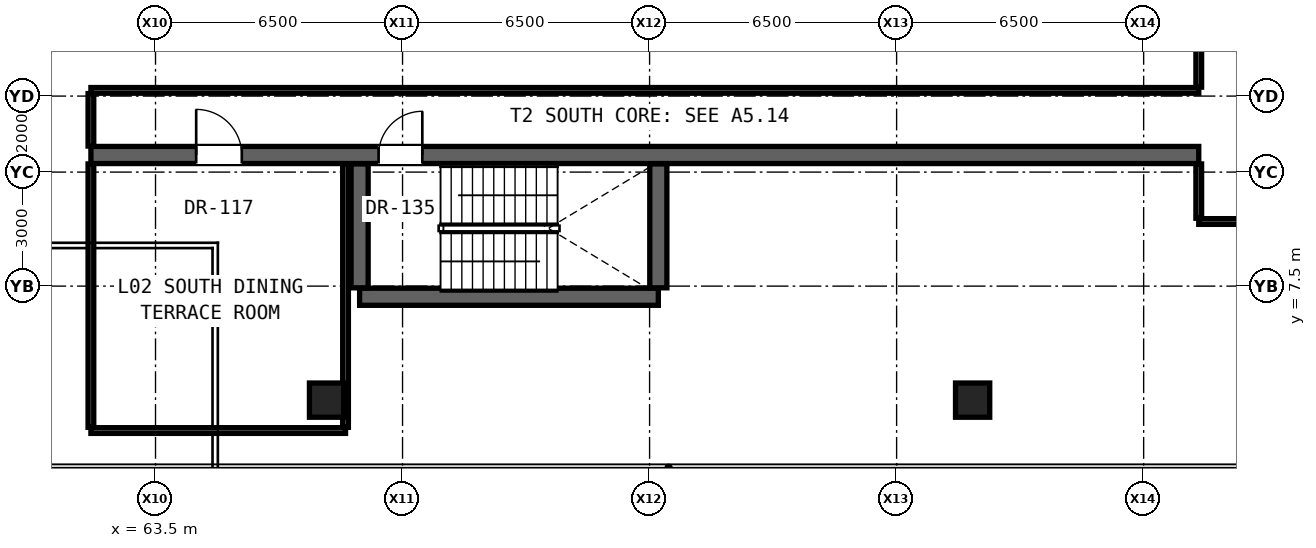
"""IFC4 building model, lengths in metres.
Left out: names, types, materials, properties, quantities, classifications, styles, units other than length and angle.
Written with IfcOpenShell. Run it as: python <this file> out.ifc"""

import sys

from ifc_helpers import new_model, si_unit, direction, frame, frame_2d, origin, origin_2d, place, context, subcontext, project, spatial, rectangle, extrude, element, fill, save


model = new_model("IFC4")
c1 = context("Model", 3, precision=1e-05, world=origin(), true_north=direction((0.0, 1.0)))
c2 = subcontext(c1, "Body", "Model", "MODEL_VIEW")
j1 = project(units=[si_unit("LENGTHUNIT", "METRE"), si_unit("PLANEANGLEUNIT", "RADIAN")], contexts=[c1])
p1 = place(None, origin())
s1 = spatial("IfcSite", under=j1, at=p1, CompositionType="ELEMENT")
p2 = place(p1, origin())
s2 = spatial("IfcBuilding", under=s1, at=p2, CompositionType="ELEMENT")
p3 = place(p2, frame((0.0, 0.0, 9.5)))
s3 = spatial("IfcBuildingStorey", under=s2, at=p3, CompositionType="ELEMENT", Elevation=9.5)
for number, where, z_axis, x_axis in (
    (1, (68.0, 4.5, 0.0), (0.0, 0.0, 1.0), (1.0, 0.0, 0.0)),
    (2, (85.0, 4.5, 0.0), (0.0, 0.0, 1.0), (1.0, 0.0, 0.0)),
):
    element("IfcColumn", number, at=place(p3, frame(where, z_axis=z_axis, x_axis=x_axis)), inside=s3, PredefinedType="COLUMN", context=c2, shape_type="SweptSolid", body=[
        extrude(rectangle(XDim=0.9, YDim=0.9, at=origin_2d()), origin(), (0.0, 0.0, 1.0), 4.3),
    ])
p4 = place(p3, frame((61.8, 3.7, 0.0), z_axis=(0.0, 0.0, 1.0), x_axis=(1.0, 0.0, 0.0)))
e3 = element("IfcWall", 3, at=p4, inside=s3, PredefinedType="PARTITIONING", context=c2, shape_type="SweptSolid", body=[
    extrude(rectangle(XDim=6.7, YDim=0.15, at=frame_2d((3.35, 0.0))), origin(), (0.0, 0.0, 1.0), 3.98),
])
p5 = place(p3, frame((68.87, 7.22, 0.0), z_axis=(0.0, 0.0, 1.0), x_axis=(1.0, 0.0, 0.0)))
e4 = element("IfcWall", 4, at=p5, inside=s3, PredefinedType="SHEAR", context=c2, shape_type="SweptSolid", body=[
    extrude(rectangle(XDim=7.86, YDim=0.45, at=frame_2d((3.93, 0.0))), origin(), (0.0, 0.0, 1.0), 3.98),
])
p6 = place(p3, frame((90.95, 9.2, 0.0), z_axis=(0.0, 0.0, 1.0), x_axis=(1.0, 0.0, 0.0)))
e5 = element("IfcWall", 5, at=p6, inside=s3, PredefinedType="PARTITIONING", context=c2, shape_type="SweptSolid", body=[
    extrude(rectangle(XDim=1.7, YDim=0.15, at=frame_2d((0.85, 0.0))), origin(), (0.0, 0.0, 1.0), 3.98),
])
p7 = place(p3, frame((61.8, 10.95, 0.0), z_axis=(0.0, 0.0, 1.0), x_axis=(1.0, 0.0, 0.0)))
e6 = element("IfcWall", 6, at=p7, inside=s3, PredefinedType="SHEAR", context=c2, shape_type="SweptSolid", body=[
    extrude(rectangle(XDim=29.15, YDim=0.45, at=frame_2d((14.575, 0.0))), origin(), (0.0, 0.0, 1.0), 3.98),
])
p8 = place(p7, frame((7.57, 0.0, 0.0)))
e7 = element("IfcOpeningElement", 7, at=p8, cuts=e6, PredefinedType="OPENING", context=c2, shape_type="SweptSolid", body=[
    extrude(rectangle(XDim=1.15, YDim=2.2, at=frame_2d((0.575, 1.1))), frame((0.0, 0.235, 0.0), z_axis=(0.0, -1.0, 0.0), x_axis=(1.0, 0.0, 0.0)), (0.0, 0.0, 1.0), 0.47),
])
p9 = place(p7, frame((2.77, 0.0, 0.0)))
e8 = element("IfcOpeningElement", 8, at=p9, cuts=e6, PredefinedType="OPENING", context=c2, shape_type="SweptSolid", body=[
    extrude(rectangle(XDim=1.2, YDim=2.25, at=frame_2d((0.6, 1.125))), frame((0.0, 0.235, 0.0), z_axis=(0.0, -1.0, 0.0), x_axis=(1.0, 0.0, 0.0)), (0.0, 0.0, 1.0), 0.47),
])
p10 = place(p3, frame((61.8, 12.65, 0.0), z_axis=(0.0, 0.0, 1.0), x_axis=(1.0, 0.0, 0.0)))
e9 = element("IfcWall", 9, at=p10, inside=s3, PredefinedType="PARTITIONING", context=c2, shape_type="SweptSolid", body=[
    extrude(rectangle(XDim=29.15, YDim=0.15, at=frame_2d((14.575, 0.0))), origin(), (0.0, 0.0, 1.0), 3.116),
])
p11 = place(p3, frame((61.8, 3.785, 0.0), z_axis=(0.0, 0.0, 1.0), x_axis=(0.0, 1.0, 0.0)))
e10 = element("IfcWall", 10, at=p11, inside=s3, PredefinedType="PARTITIONING", context=c2, shape_type="SweptSolid", body=[
    extrude(rectangle(XDim=6.93, YDim=0.15, at=frame_2d((3.465, 0.0))), origin(), (0.0, 0.0, 1.0), 3.199),
])
p12 = place(p3, frame((61.8, 11.185, 0.0), z_axis=(0.0, 0.0, 1.0), x_axis=(0.0, 1.0, 0.0)))
e11 = element("IfcWall", 11, at=p12, inside=s3, PredefinedType="PARTITIONING", context=c2, shape_type="SweptSolid", body=[
    extrude(rectangle(XDim=1.38, YDim=0.15, at=frame_2d((0.69, 0.0))), origin(), (0.0, 0.0, 1.0), 3.98),
])
p13 = place(p3, frame((68.5, 3.785, 0.0), z_axis=(0.0, 0.0, 1.0), x_axis=(0.0, 1.0, 0.0)))
e12 = element("IfcWall", 12, at=p13, inside=s3, PredefinedType="PARTITIONING", context=c2, shape_type="SweptSolid", body=[
    extrude(rectangle(XDim=6.93, YDim=0.15, at=frame_2d((3.465, 0.0))), origin(), (0.0, 0.0, 1.0), 3.116),
])
for number, where, z_axis, x_axis in (
    (13, (68.87, 7.455, 0.0), (0.0, 0.0, 1.0), (0.0, 1.0, 0.0)),
    (14, (76.73, 7.455, 0.0), (0.0, 0.0, 1.0), (0.0, 1.0, 0.0)),
):
    element("IfcWall", number, at=place(p3, frame(where, z_axis=z_axis, x_axis=x_axis)), inside=s3, PredefinedType="SHEAR", context=c2, shape_type="SweptSolid", body=[
        extrude(rectangle(XDim=3.26, YDim=0.45, at=frame_2d((1.63, 0.0))), origin(), (0.0, 0.0, 1.0), 3.98),
    ])
p14 = place(p3, frame((90.95, 9.285, 0.0), z_axis=(0.0, 0.0, 1.0), x_axis=(0.0, 1.0, 0.0)))
e15 = element("IfcWall", 15, at=p14, inside=s3, PredefinedType="PARTITIONING", context=c2, shape_type="SweptSolid", body=[
    extrude(rectangle(XDim=1.43, YDim=0.15, at=frame_2d((0.715, 0.0))), origin(), (0.0, 0.0, 1.0), 3.98),
])
p15 = place(p3, frame((90.95, 12.735, 0.0), z_axis=(0.0, 0.0, 1.0), x_axis=(0.0, 1.0, 0.0)))
e16 = element("IfcWall", 16, at=p15, inside=s3, PredefinedType="PARTITIONING", context=c2, shape_type="SweptSolid", body=[
    extrude(rectangle(XDim=7.98, YDim=0.15, at=frame_2d((3.99, 0.0))), origin(), (0.0, 0.0, 1.0), 3.116),
])
p16 = place(p8, origin())
e17 = element("IfcDoor", 17, at=p16, inside=s3, OperationType="SINGLE_SWING_RIGHT", PredefinedType="DOOR", context=c2, shape_type="SweptSolid", body=[
    extrude(rectangle(XDim=1.15, YDim=2.2, at=frame_2d((0.575, 1.1))), frame((0.0, 0.025, 0.0), z_axis=(0.0, -1.0, 0.0), x_axis=(1.0, 0.0, 0.0)), (0.0, 0.0, 1.0), 0.05),
])
fill(e7, e17)
p17 = place(p9, origin())
e18 = element("IfcDoor", 18, at=p17, inside=s3, OperationType="SINGLE_SWING_LEFT", PredefinedType="DOOR", context=c2, shape_type="SweptSolid", body=[
    extrude(rectangle(XDim=1.2, YDim=2.25, at=frame_2d((0.6, 1.125))), frame((0.0, 0.025, 0.0), z_axis=(0.0, -1.0, 0.0), x_axis=(1.0, 0.0, 0.0)), (0.0, 0.0, 1.0), 0.05),
])
fill(e8, e18)
save(model, sys.argv[1])
